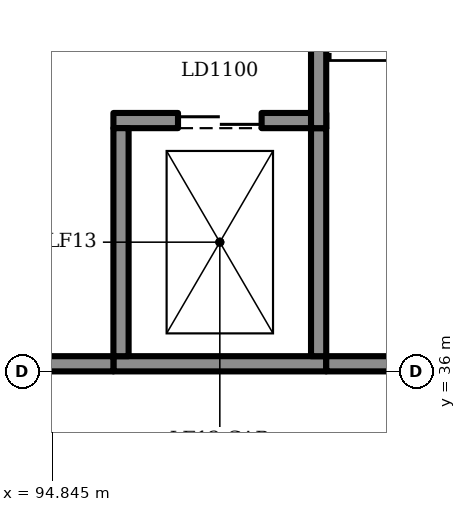
"""IFC4 building model, lengths in metres.
Left out: names, types, materials, properties, quantities, classifications, styles, units other than length and angle.
Written with IfcOpenShell. Run it as: python <this file> out.ifc"""

import sys

from ifc_helpers import new_model, si_unit, direction, frame, frame_2d, origin, place, context, subcontext, project, spatial, rectangle, extrude, element, fill, save


model = new_model("IFC4")
c1 = context("Model", 3, precision=1e-05, world=origin(), true_north=direction((0.0, 1.0)))
c2 = subcontext(c1, "Body", "Model", "MODEL_VIEW")
j1 = project(units=[si_unit("LENGTHUNIT", "METRE"), si_unit("PLANEANGLEUNIT", "RADIAN")], contexts=[c1])
p1 = place(None, origin())
s1 = spatial("IfcSite", under=j1, at=p1, CompositionType="ELEMENT")
p2 = place(p1, origin())
s2 = spatial("IfcBuilding", under=s1, at=p2, CompositionType="ELEMENT")
p3 = place(p2, frame((0.0, 0.0, 5.4)))
s3 = spatial("IfcBuildingStorey", under=s2, at=p3, CompositionType="ELEMENT", Elevation=5.4)
p4 = place(p3, frame((95.65, 36.1, 0.0), z_axis=(0.0, 0.0, 1.0), x_axis=(1.0, 0.0, 0.0)))
e1 = element("IfcWall", 1, at=p4, inside=s3, PredefinedType="SOLIDWALL", context=c2, shape_type="SweptSolid", body=[
    extrude(rectangle(XDim=2.8, YDim=0.2, at=frame_2d((1.4, 0.0))), origin(), (0.0, 0.0, 1.0), 4.25),
])
p5 = place(p3, frame((95.65, 39.3, 0.0), z_axis=(0.0, 0.0, 1.0), x_axis=(1.0, 0.0, 0.0)))
e2 = element("IfcWall", 2, at=p5, inside=s3, PredefinedType="SOLIDWALL", context=c2, shape_type="SweptSolid", body=[
    extrude(rectangle(XDim=2.8, YDim=0.2, at=frame_2d((1.4, 0.0))), origin(), (0.0, 0.0, 1.0), 4.25),
])
p6 = place(p5, frame((0.85, 0.0, 0.0)))
e3 = element("IfcOpeningElement", 3, at=p6, cuts=e2, PredefinedType="OPENING", context=c2, shape_type="SweptSolid", body=[
    extrude(rectangle(XDim=1.1, YDim=2.1, at=frame_2d((0.55, 1.05))), frame((0.0, 0.11, 0.0), z_axis=(0.0, -1.0, 0.0), x_axis=(1.0, 0.0, 0.0)), (0.0, 0.0, 1.0), 0.22),
])
for number, where, z_axis, x_axis in (
    (4, (95.75, 36.2, 0.0), (0.0, 0.0, 1.0), (0.0, 1.0, 0.0)),
    (5, (98.35, 36.2, 0.0), (0.0, 0.0, 1.0), (0.0, 1.0, 0.0)),
):
    element("IfcWall", number, at=place(p3, frame(where, z_axis=z_axis, x_axis=x_axis)), inside=s3, PredefinedType="SOLIDWALL", context=c2, shape_type="SweptSolid", body=[
        extrude(rectangle(XDim=3.0, YDim=0.2, at=frame_2d((1.5, 0.0))), origin(), (0.0, 0.0, 1.0), 4.25),
    ])
p7 = place(p3, frame((92.654, 36.1, 0.0), z_axis=(0.0, 0.0, 1.0), x_axis=(1.0, 0.0, 0.0)))
e6 = element("IfcWall", 6, at=p7, inside=s3, PredefinedType="SOLIDWALL", context=c2, shape_type="SweptSolid", body=[
    extrude(rectangle(XDim=2.996, YDim=0.2, at=frame_2d((1.498, 0.0))), origin(), (0.0, 0.0, 1.0), 4.25),
])
p8 = place(p3, frame((98.45, 36.1, 0.0), z_axis=(0.0, 0.0, 1.0), x_axis=(1.0, 0.0, 0.0)))
e7 = element("IfcWall", 7, at=p8, inside=s3, PredefinedType="SOLIDWALL", context=c2, shape_type="SweptSolid", body=[
    extrude(rectangle(XDim=2.896, YDim=0.2, at=frame_2d((1.448, 0.0))), origin(), (0.0, 0.0, 1.0), 4.25),
])
p9 = place(p3, frame((98.35, 39.2, 0.0), z_axis=(0.0, 0.0, 1.0), x_axis=(0.0, 1.0, 0.0)))
e8 = element("IfcWall", 8, at=p9, inside=s3, PredefinedType="SOLIDWALL", context=c2, shape_type="SweptSolid", body=[
    extrude(rectangle(XDim=5.6, YDim=0.2, at=frame_2d((2.8, 0.0))), origin(), (0.0, 0.0, 1.0), 4.25),
])
p10 = place(p9, frame((4.35, 0.0, 0.0)))
e9 = element("IfcOpeningElement", 9, at=p10, cuts=e8, PredefinedType="OPENING", context=c2, shape_type="SweptSolid", body=[
    extrude(rectangle(XDim=1.1, YDim=2.1, at=frame_2d((0.55, 1.05))), frame((0.0, 0.11, 0.0), z_axis=(0.0, -1.0, 0.0), x_axis=(1.0, 0.0, 0.0)), (0.0, 0.0, 1.0), 0.22),
])
p11 = place(p6, origin())
e10 = element("IfcDoor", 10, at=p11, inside=s3, OperationType="SLIDING_TO_LEFT", PredefinedType="DOOR", context=c2, shape_type="SweptSolid", body=[
    extrude(rectangle(XDim=1.1, YDim=2.1, at=frame_2d((0.55, 1.05))), frame((0.0, 0.025, 0.0), z_axis=(0.0, -1.0, 0.0), x_axis=(1.0, 0.0, 0.0)), (0.0, 0.0, 1.0), 0.05),
])
fill(e3, e10)
save(model, sys.argv[1])
